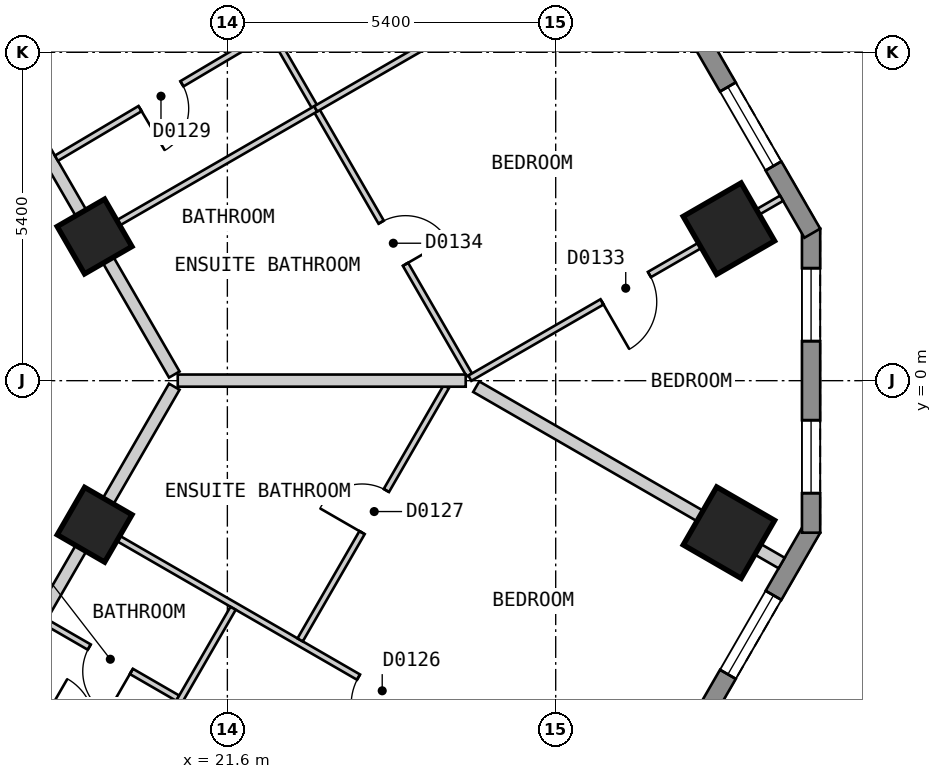
"""IFC4 building model, lengths in metres.
Left out: names, types, materials, properties, quantities, classifications, styles, units other than length and angle.
Written with IfcOpenShell. Run it as: python <this file> out.ifc"""

import sys

from ifc_helpers import new_model, si_unit, direction, frame, frame_2d, origin, origin_2d, place, context, subcontext, project, spatial, polyline, rectangle, outline, extrude, element, fill, save


model = new_model("IFC4")
c1 = context("Model", 3, precision=1e-05, world=origin(), true_north=direction((0.0, 1.0)))
c2 = subcontext(c1, "Body", "Model", "MODEL_VIEW")
j1 = project(units=[si_unit("LENGTHUNIT", "METRE"), si_unit("PLANEANGLEUNIT", "RADIAN")], contexts=[c1])
p1 = place(None, origin())
s1 = spatial("IfcSite", under=j1, at=p1, CompositionType="ELEMENT")
p2 = place(p1, origin())
s2 = spatial("IfcBuilding", under=s1, at=p2, CompositionType="ELEMENT")
p3 = place(p2, frame((0.0, 0.0, 29.4)))
s3 = spatial("IfcBuildingStorey", under=s2, at=p3, CompositionType="ELEMENT", Elevation=29.4)
for number, where, z_axis, x_axis in (
    (1, (29.849, -2.499, 0.0), (0.0, 0.0, 1.0), (0.5, 0.866, 0.0)),
    (2, (29.848, 2.5, 0.0), (0.0, 0.0, 1.0), (-0.5, 0.866, 0.0)),
):
    element("IfcColumn", number, at=place(p3, frame(where, z_axis=z_axis, x_axis=x_axis)), inside=s3, PredefinedType="COLUMN", context=c2, shape_type="SweptSolid", body=[
        extrude(rectangle(XDim=1.1, YDim=1.1, at=origin_2d()), origin(), (0.0, 0.0, 1.0), 3.0),
    ])
for number, where, z_axis, x_axis in (
    (3, (19.417, -2.369, 0.0), (0.0, 0.0, 1.0), (0.5, 0.866, 0.0)),
    (4, (19.416, 2.371, 0.0), (0.0, 0.0, 1.0), (-0.5, 0.866, 0.0)),
):
    element("IfcColumn", number, at=place(p3, frame(where, z_axis=z_axis, x_axis=x_axis)), inside=s3, PredefinedType="COLUMN", context=c2, shape_type="SweptSolid", body=[
        extrude(rectangle(XDim=0.9, YDim=0.9, at=origin_2d()), origin(), (0.0, 0.0, 1.0), 3.0),
    ])
p4 = place(p3, frame((17.71, -25.825, 0.0), z_axis=(0.0, 0.0, 1.0), x_axis=(0.500001938803, 0.866024284413, 0.0)))
e5 = element("IfcWall", 5, at=p4, inside=s3, PredefinedType="SOLIDWALL", context=c2, shape_type="SweptSolid", body=[
    extrude(outline(polyline([(0.0, -0.15), (27.02, -0.15), (26.94, 0.15), (0.08, 0.15), (0.0, -0.15)])), origin(), (0.0, 0.0, 1.0), 2.7),
])
p5 = place(p4, frame((1.277, 0.0, 0.15)))
e6 = element("IfcOpeningElement", 6, at=p5, cuts=e5, PredefinedType="OPENING", context=c2, shape_type="SweptSolid", body=[
    extrude(rectangle(XDim=1.5, YDim=2.1, at=frame_2d((0.75, 1.05))), frame((0.0, 0.16, 0.0), z_axis=(0.0, -1.0, 0.0), x_axis=(1.0, 0.0, 0.0)), (0.0, 0.0, 1.0), 0.32),
])
p6 = place(p4, frame((3.829, 0.0, 0.15)))
e7 = element("IfcOpeningElement", 7, at=p6, cuts=e5, PredefinedType="OPENING", context=c2, shape_type="SweptSolid", body=[
    extrude(rectangle(XDim=1.5, YDim=2.1, at=frame_2d((0.75, 1.05))), frame((0.0, 0.16, 0.0), z_axis=(0.0, -1.0, 0.0), x_axis=(1.0, 0.0, 0.0)), (0.0, 0.0, 1.0), 0.32),
])
p7 = place(p4, frame((6.382, 0.0, 0.15)))
e8 = element("IfcOpeningElement", 8, at=p7, cuts=e5, PredefinedType="OPENING", context=c2, shape_type="SweptSolid", body=[
    extrude(rectangle(XDim=1.5, YDim=2.1, at=frame_2d((0.75, 1.05))), frame((0.0, 0.16, 0.0), z_axis=(0.0, -1.0, 0.0), x_axis=(1.0, 0.0, 0.0)), (0.0, 0.0, 1.0), 0.32),
])
p8 = place(p4, frame((8.933, 0.0, 0.15)))
e9 = element("IfcOpeningElement", 9, at=p8, cuts=e5, PredefinedType="OPENING", context=c2, shape_type="SweptSolid", body=[
    extrude(rectangle(XDim=1.5, YDim=2.1, at=frame_2d((0.75, 1.05))), frame((0.0, 0.16, 0.0), z_axis=(0.0, -1.0, 0.0), x_axis=(1.0, 0.0, 0.0)), (0.0, 0.0, 1.0), 0.32),
])
p9 = place(p4, frame((11.485, 0.0, 0.15)))
e10 = element("IfcOpeningElement", 10, at=p9, cuts=e5, PredefinedType="OPENING", context=c2, shape_type="SweptSolid", body=[
    extrude(rectangle(XDim=1.5, YDim=2.1, at=frame_2d((0.75, 1.05))), frame((0.0, 0.16, 0.0), z_axis=(0.0, -1.0, 0.0), x_axis=(1.0, 0.0, 0.0)), (0.0, 0.0, 1.0), 0.32),
])
p10 = place(p4, frame((14.037, 0.0, 0.15)))
e11 = element("IfcOpeningElement", 11, at=p10, cuts=e5, PredefinedType="OPENING", context=c2, shape_type="SweptSolid", body=[
    extrude(rectangle(XDim=1.5, YDim=2.1, at=frame_2d((0.75, 1.05))), frame((0.0, 0.16, 0.0), z_axis=(0.0, -1.0, 0.0), x_axis=(1.0, 0.0, 0.0)), (0.0, 0.0, 1.0), 0.32),
])
p11 = place(p4, frame((16.589, 0.0, 0.15)))
e12 = element("IfcOpeningElement", 12, at=p11, cuts=e5, PredefinedType="OPENING", context=c2, shape_type="SweptSolid", body=[
    extrude(rectangle(XDim=1.5, YDim=2.1, at=frame_2d((0.75, 1.05))), frame((0.0, 0.16, 0.0), z_axis=(0.0, -1.0, 0.0), x_axis=(1.0, 0.0, 0.0)), (0.0, 0.0, 1.0), 0.32),
])
p12 = place(p4, frame((19.141, 0.0, 0.15)))
e13 = element("IfcOpeningElement", 13, at=p12, cuts=e5, PredefinedType="OPENING", context=c2, shape_type="SweptSolid", body=[
    extrude(rectangle(XDim=1.5, YDim=2.1, at=frame_2d((0.75, 1.05))), frame((0.0, 0.16, 0.0), z_axis=(0.0, -1.0, 0.0), x_axis=(1.0, 0.0, 0.0)), (0.0, 0.0, 1.0), 0.32),
])
p13 = place(p4, frame((21.693, 0.0, 0.15)))
e14 = element("IfcOpeningElement", 14, at=p13, cuts=e5, PredefinedType="OPENING", context=c2, shape_type="SweptSolid", body=[
    extrude(rectangle(XDim=1.5, YDim=2.1, at=frame_2d((0.75, 1.05))), frame((0.0, 0.16, 0.0), z_axis=(0.0, -1.0, 0.0), x_axis=(1.0, 0.0, 0.0)), (0.0, 0.0, 1.0), 0.32),
])
p14 = place(p4, frame((24.244, 0.0, 0.15)))
e15 = element("IfcOpeningElement", 15, at=p14, cuts=e5, PredefinedType="OPENING", context=c2, shape_type="SweptSolid", body=[
    extrude(rectangle(XDim=1.5, YDim=2.1, at=frame_2d((0.75, 1.05))), frame((0.0, 0.16, 0.0), z_axis=(0.0, -1.0, 0.0), x_axis=(1.0, 0.0, 0.0)), (0.0, 0.0, 1.0), 0.32),
])
p15 = place(p3, frame((31.2, -2.5, 0.0), z_axis=(0.0, 0.0, 1.0), x_axis=(0.0, 1.0, 0.0)))
e16 = element("IfcWall", 16, at=p15, inside=s3, PredefinedType="SOLIDWALL", context=c2, shape_type="SweptSolid", body=[
    extrude(outline(polyline([(0.0, -0.15), (5.0, -0.15), (4.92, 0.15), (0.08, 0.15), (0.0, -0.15)])), origin(), (0.0, 0.0, 1.0), 2.7),
])
p16 = place(p15, frame((0.65, 0.0, 0.15)))
e17 = element("IfcOpeningElement", 17, at=p16, cuts=e16, PredefinedType="OPENING", context=c2, shape_type="SweptSolid", body=[
    extrude(rectangle(XDim=1.2, YDim=2.1, at=frame_2d((0.6, 1.05))), frame((0.0, 0.16, 0.0), z_axis=(0.0, -1.0, 0.0), x_axis=(1.0, 0.0, 0.0)), (0.0, 0.0, 1.0), 0.32),
])
p17 = place(p15, frame((3.15, 0.0, 0.15)))
e18 = element("IfcOpeningElement", 18, at=p17, cuts=e16, PredefinedType="OPENING", context=c2, shape_type="SweptSolid", body=[
    extrude(rectangle(XDim=1.2, YDim=2.1, at=frame_2d((0.6, 1.05))), frame((0.0, 0.16, 0.0), z_axis=(0.0, -1.0, 0.0), x_axis=(1.0, 0.0, 0.0)), (0.0, 0.0, 1.0), 0.32),
])
p18 = place(p3, frame((31.22, 2.425, 0.0), z_axis=(0.0, 0.0, 1.0), x_axis=(-0.500001938803, 0.866024284413, 0.0)))
e19 = element("IfcWall", 19, at=p18, inside=s3, PredefinedType="SOLIDWALL", context=c2, shape_type="SweptSolid", body=[
    extrude(outline(polyline([(0.0, -0.15), (27.02, -0.15), (26.94, 0.15), (0.08, 0.15), (0.0, -0.15)])), origin(), (0.0, 0.0, 1.0), 2.7),
])
p19 = place(p18, frame((1.277, 0.0, 0.15)))
e20 = element("IfcOpeningElement", 20, at=p19, cuts=e19, PredefinedType="OPENING", context=c2, shape_type="SweptSolid", body=[
    extrude(rectangle(XDim=1.5, YDim=2.1, at=frame_2d((0.75, 1.05))), frame((0.0, 0.16, 0.0), z_axis=(0.0, -1.0, 0.0), x_axis=(1.0, 0.0, 0.0)), (0.0, 0.0, 1.0), 0.32),
])
p20 = place(p18, frame((3.829, 0.0, 0.15)))
e21 = element("IfcOpeningElement", 21, at=p20, cuts=e19, PredefinedType="OPENING", context=c2, shape_type="SweptSolid", body=[
    extrude(rectangle(XDim=1.5, YDim=2.1, at=frame_2d((0.75, 1.05))), frame((0.0, 0.16, 0.0), z_axis=(0.0, -1.0, 0.0), x_axis=(1.0, 0.0, 0.0)), (0.0, 0.0, 1.0), 0.32),
])
p21 = place(p18, frame((6.382, 0.0, 0.15)))
e22 = element("IfcOpeningElement", 22, at=p21, cuts=e19, PredefinedType="OPENING", context=c2, shape_type="SweptSolid", body=[
    extrude(rectangle(XDim=1.5, YDim=2.1, at=frame_2d((0.75, 1.05))), frame((0.0, 0.16, 0.0), z_axis=(0.0, -1.0, 0.0), x_axis=(1.0, 0.0, 0.0)), (0.0, 0.0, 1.0), 0.32),
])
p22 = place(p18, frame((8.933, 0.0, 0.15)))
e23 = element("IfcOpeningElement", 23, at=p22, cuts=e19, PredefinedType="OPENING", context=c2, shape_type="SweptSolid", body=[
    extrude(rectangle(XDim=1.5, YDim=2.1, at=frame_2d((0.75, 1.05))), frame((0.0, 0.16, 0.0), z_axis=(0.0, -1.0, 0.0), x_axis=(1.0, 0.0, 0.0)), (0.0, 0.0, 1.0), 0.32),
])
p23 = place(p18, frame((11.485, 0.0, 0.15)))
e24 = element("IfcOpeningElement", 24, at=p23, cuts=e19, PredefinedType="OPENING", context=c2, shape_type="SweptSolid", body=[
    extrude(rectangle(XDim=1.5, YDim=2.1, at=frame_2d((0.75, 1.05))), frame((0.0, 0.16, 0.0), z_axis=(0.0, -1.0, 0.0), x_axis=(1.0, 0.0, 0.0)), (0.0, 0.0, 1.0), 0.32),
])
p24 = place(p18, frame((14.037, 0.0, 0.15)))
e25 = element("IfcOpeningElement", 25, at=p24, cuts=e19, PredefinedType="OPENING", context=c2, shape_type="SweptSolid", body=[
    extrude(rectangle(XDim=1.5, YDim=2.1, at=frame_2d((0.75, 1.05))), frame((0.0, 0.16, 0.0), z_axis=(0.0, -1.0, 0.0), x_axis=(1.0, 0.0, 0.0)), (0.0, 0.0, 1.0), 0.32),
])
p25 = place(p18, frame((16.589, 0.0, 0.15)))
e26 = element("IfcOpeningElement", 26, at=p25, cuts=e19, PredefinedType="OPENING", context=c2, shape_type="SweptSolid", body=[
    extrude(rectangle(XDim=1.5, YDim=2.1, at=frame_2d((0.75, 1.05))), frame((0.0, 0.16, 0.0), z_axis=(0.0, -1.0, 0.0), x_axis=(1.0, 0.0, 0.0)), (0.0, 0.0, 1.0), 0.32),
])
p26 = place(p18, frame((19.141, 0.0, 0.15)))
e27 = element("IfcOpeningElement", 27, at=p26, cuts=e19, PredefinedType="OPENING", context=c2, shape_type="SweptSolid", body=[
    extrude(rectangle(XDim=1.5, YDim=2.1, at=frame_2d((0.75, 1.05))), frame((0.0, 0.16, 0.0), z_axis=(0.0, -1.0, 0.0), x_axis=(1.0, 0.0, 0.0)), (0.0, 0.0, 1.0), 0.32),
])
p27 = place(p18, frame((21.693, 0.0, 0.15)))
e28 = element("IfcOpeningElement", 28, at=p27, cuts=e19, PredefinedType="OPENING", context=c2, shape_type="SweptSolid", body=[
    extrude(rectangle(XDim=1.5, YDim=2.1, at=frame_2d((0.75, 1.05))), frame((0.0, 0.16, 0.0), z_axis=(0.0, -1.0, 0.0), x_axis=(1.0, 0.0, 0.0)), (0.0, 0.0, 1.0), 0.32),
])
p28 = place(p18, frame((24.244, 0.0, 0.15)))
e29 = element("IfcOpeningElement", 29, at=p28, cuts=e19, PredefinedType="OPENING", context=c2, shape_type="SweptSolid", body=[
    extrude(rectangle(XDim=1.5, YDim=2.1, at=frame_2d((0.75, 1.05))), frame((0.0, 0.16, 0.0), z_axis=(0.0, -1.0, 0.0), x_axis=(1.0, 0.0, 0.0)), (0.0, 0.0, 1.0), 0.32),
])
p29 = place(p3, frame((10.45, 17.9, 0.0), z_axis=(0.0, 0.0, 1.0), x_axis=(0.500034352617, -0.866005569383, 0.0)))
e30 = element("IfcWall", 30, at=p29, inside=s3, PredefinedType="PARTITIONING", context=c2, shape_type="SweptSolid", body=[
    extrude(rectangle(XDim=20.553, YDim=0.2, at=frame_2d((10.276, 0.0))), origin(), (0.0, 0.0, 1.0), 2.7),
])
p30 = place(p29, frame((14.903, 0.0, 0.0)))
e31 = element("IfcOpeningElement", 31, at=p30, cuts=e30, PredefinedType="OPENING", context=c2, shape_type="SweptSolid", body=[
    extrude(rectangle(XDim=1.0, YDim=2.1, at=frame_2d((0.5, 1.05))), frame((0.0, 0.11, 0.0), z_axis=(0.0, -1.0, 0.0), x_axis=(1.0, 0.0, 0.0)), (0.0, 0.0, 1.0), 0.22),
])
p31 = place(p29, frame((9.775, 0.0, 0.0)))
e32 = element("IfcOpeningElement", 32, at=p31, cuts=e30, PredefinedType="OPENING", context=c2, shape_type="SweptSolid", body=[
    extrude(rectangle(XDim=1.0, YDim=2.1, at=frame_2d((0.5, 1.05))), frame((0.0, 0.11, 0.0), z_axis=(0.0, -1.0, 0.0), x_axis=(1.0, 0.0, 0.0)), (0.0, 0.0, 1.0), 0.22),
])
p32 = place(p3, frame((16.914, -6.703, 0.0), z_axis=(0.0, 0.0, 1.0), x_axis=(0.50003007663, 0.866008038338, 0.0)))
e33 = element("IfcWall", 33, at=p32, inside=s3, PredefinedType="PARTITIONING", context=c2, shape_type="SweptSolid", body=[
    extrude(rectangle(XDim=7.625, YDim=0.2, at=frame_2d((3.813, 0.0))), origin(), (0.0, 0.0, 1.0), 2.7),
])
p33 = place(p32, frame((1.952, 0.0, 0.0)))
e34 = element("IfcOpeningElement", 34, at=p33, cuts=e33, PredefinedType="OPENING", context=c2, shape_type="SweptSolid", body=[
    extrude(rectangle(XDim=1.0, YDim=2.1, at=frame_2d((0.5, 1.05))), frame((0.0, 0.11, 0.0), z_axis=(0.0, -1.0, 0.0), x_axis=(1.0, 0.0, 0.0)), (0.0, 0.0, 1.0), 0.22),
])
p34 = place(p3, frame((20.551, 8.805, 0.0), z_axis=(0.0, 0.0, 1.0), x_axis=(0.499984387913, -0.86603441724, 0.0)))
e35 = element("IfcWall", 35, at=p34, inside=s3, PredefinedType="PARTITIONING", context=c2, shape_type="SweptSolid", body=[
    extrude(rectangle(XDim=10.058, YDim=0.1, at=frame_2d((5.029, 0.0))), origin(), (0.0, 0.0, 1.0), 2.7),
])
p35 = place(p34, frame((1.978, 0.0, 0.0)))
e36 = element("IfcOpeningElement", 36, at=p35, cuts=e35, PredefinedType="OPENING", context=c2, shape_type="SweptSolid", body=[
    extrude(rectangle(XDim=0.9, YDim=2.1, at=frame_2d((0.45, 1.05))), frame((0.0, 0.06, 0.0), z_axis=(0.0, -1.0, 0.0), x_axis=(1.0, 0.0, 0.0)), (0.0, 0.0, 1.0), 0.12),
])
p36 = place(p34, frame((7.157, 0.0, 0.0)))
e37 = element("IfcOpeningElement", 37, at=p36, cuts=e35, PredefinedType="OPENING", context=c2, shape_type="SweptSolid", body=[
    extrude(rectangle(XDim=0.8, YDim=2.1, at=frame_2d((0.4, 1.05))), frame((0.0, 0.06, 0.0), z_axis=(0.0, -1.0, 0.0), x_axis=(1.0, 0.0, 0.0)), (0.0, 0.0, 1.0), 0.12),
])
p37 = place(p3, frame((18.61, -3.966, 0.0), z_axis=(0.0, 0.0, 1.0), x_axis=(0.865958718457, -0.500115484592, 0.0)))
e38 = element("IfcWall", 38, at=p37, inside=s3, PredefinedType="PARTITIONING", context=c2, shape_type="SweptSolid", body=[
    extrude(rectangle(XDim=2.509, YDim=0.1, at=frame_2d((1.255, 0.0))), origin(), (0.0, 0.0, 1.0), 2.7),
])
p38 = place(p37, frame((0.83, 0.0, 0.0)))
e39 = element("IfcOpeningElement", 39, at=p38, cuts=e38, PredefinedType="OPENING", context=c2, shape_type="SweptSolid", body=[
    extrude(rectangle(XDim=0.8, YDim=2.1, at=frame_2d((0.4, 1.05))), frame((0.0, 0.06, 0.0), z_axis=(0.0, -1.0, 0.0), x_axis=(1.0, 0.0, 0.0)), (0.0, 0.0, 1.0), 0.12),
])
p39 = place(p3, frame((19.503, -2.419, 0.0), z_axis=(0.0, 0.0, 1.0), x_axis=(0.866047370643, -0.499961950354, 0.0)))
e40 = element("IfcWall", 40, at=p39, inside=s3, PredefinedType="PARTITIONING", context=c2, shape_type="SweptSolid", body=[
    extrude(rectangle(XDim=10.001, YDim=0.1, at=frame_2d((5.0, 0.0))), origin(), (0.0, 0.0, 1.0), 2.7),
])
p40 = place(p39, frame((4.912, 0.0, 0.0)))
e41 = element("IfcOpeningElement", 41, at=p40, cuts=e40, PredefinedType="OPENING", context=c2, shape_type="SweptSolid", body=[
    extrude(rectangle(XDim=0.9, YDim=2.1, at=frame_2d((0.45, 1.05))), frame((0.0, 0.06, 0.0), z_axis=(0.0, -1.0, 0.0), x_axis=(1.0, 0.0, 0.0)), (0.0, 0.0, 1.0), 0.12),
])
p41 = place(p3, frame((20.062, -6.571, 0.0), z_axis=(0.0, 0.0, 1.0), x_axis=(0.49983032932, 0.866123341039, 0.0)))
e42 = element("IfcWall", 42, at=p41, inside=s3, PredefinedType="PARTITIONING", context=c2, shape_type="SweptSolid", body=[
    extrude(rectangle(XDim=3.265, YDim=0.1, at=frame_2d((1.633, 0.0))), origin(), (0.0, 0.0, 1.0), 2.7),
])
p42 = place(p3, frame((22.797, -4.263, 0.0), z_axis=(0.0, 0.0, 1.0), x_axis=(0.499820637322, 0.866128934112, 0.0)))
e43 = element("IfcWall", 43, at=p42, inside=s3, PredefinedType="PARTITIONING", context=c2, shape_type="SweptSolid", body=[
    extrude(rectangle(XDim=4.807, YDim=0.1, at=frame_2d((2.404, 0.0))), origin(), (0.0, 0.0, 1.0), 2.7),
])
p43 = place(p42, frame((2.037, 0.0, 0.0)))
e44 = element("IfcOpeningElement", 44, at=p43, cuts=e43, PredefinedType="OPENING", context=c2, shape_type="SweptSolid", body=[
    extrude(rectangle(XDim=0.8, YDim=2.1, at=frame_2d((0.4, 1.05))), frame((0.0, 0.06, 0.0), z_axis=(0.0, -1.0, 0.0), x_axis=(1.0, 0.0, 0.0)), (0.0, 0.0, 1.0), 0.12),
])
p44 = place(p3, frame((19.503, 2.421, 0.0), z_axis=(0.0, 0.0, 1.0), x_axis=(0.866083434238, 0.499899474834, 0.0)))
e45 = element("IfcWall", 45, at=p44, inside=s3, PredefinedType="PARTITIONING", context=c2, shape_type="SweptSolid", body=[
    extrude(rectangle(XDim=4.099, YDim=0.1, at=frame_2d((2.049, 0.0))), origin(), (0.0, 0.0, 1.0), 2.7),
])
p45 = place(p3, frame((25.588, 0.041, 0.0), z_axis=(0.0, 0.0, 1.0), x_axis=(0.866113484451, 0.499847408768, 0.0)))
e46 = element("IfcWall", 46, at=p45, inside=s3, PredefinedType="PARTITIONING", context=c2, shape_type="SweptSolid", body=[
    extrude(rectangle(XDim=5.92, YDim=0.1, at=frame_2d((2.96, 0.0))), origin(), (0.0, 0.0, 1.0), 2.7),
])
p46 = place(p45, frame((2.51, 0.0, 0.0)))
e47 = element("IfcOpeningElement", 47, at=p46, cuts=e46, PredefinedType="OPENING", context=c2, shape_type="SweptSolid", body=[
    extrude(rectangle(XDim=0.9, YDim=2.1, at=frame_2d((0.45, 1.05))), frame((0.0, 0.06, 0.0), z_axis=(0.0, -1.0, 0.0), x_axis=(1.0, 0.0, 0.0)), (0.0, 0.0, 1.0), 0.12),
])
p47 = place(p3, frame((18.788, 3.658, 0.0), z_axis=(0.0, 0.0, 1.0), x_axis=(0.860114269096, 0.510101405701, 0.0)))
e48 = element("IfcWall", 48, at=p47, inside=s3, PredefinedType="PARTITIONING", context=c2, shape_type="SweptSolid", body=[
    extrude(rectangle(XDim=4.051, YDim=0.1, at=frame_2d((2.025, 0.0))), origin(), (0.0, 0.0, 1.0), 2.7),
])
p48 = place(p47, frame((1.6, 0.0, 0.0)))
e49 = element("IfcOpeningElement", 49, at=p48, cuts=e48, PredefinedType="OPENING", context=c2, shape_type="SweptSolid", body=[
    extrude(rectangle(XDim=0.8, YDim=2.1, at=frame_2d((0.4, 1.05))), frame((0.0, 0.06, 0.0), z_axis=(0.0, -1.0, 0.0), x_axis=(1.0, 0.0, 0.0)), (0.0, 0.0, 1.0), 0.12),
])
p49 = place(p3, frame((25.693, -0.099, 0.0), z_axis=(0.0, 0.0, 1.0), x_axis=(0.866032775405, -0.499987231761, 0.0)))
e50 = element("IfcWall", 50, at=p49, inside=s3, PredefinedType="PARTITIONING", context=c2, shape_type="SweptSolid", body=[
    extrude(rectangle(XDim=5.8, YDim=0.2, at=frame_2d((2.9, 0.0))), origin(), (0.0, 0.0, 1.0), 2.7),
])
p50 = place(p3, frame((20.784, 0.001, 0.0), z_axis=(0.0, 0.0, 1.0), x_axis=(1.0, 0.0, 0.0)))
e51 = element("IfcWall", 51, at=p50, inside=s3, PredefinedType="PARTITIONING", context=c2, shape_type="SweptSolid", body=[
    extrude(rectangle(XDim=4.736, YDim=0.2, at=frame_2d((2.368, 0.0))), origin(), (0.0, 0.0, 1.0), 2.7),
])
p51 = place(p3, frame((23.053, 4.47, 0.0), z_axis=(0.0, 0.0, 1.0), x_axis=(0.866052608538, 0.499952877023, 0.0)))
e52 = element("IfcWall", 52, at=p51, inside=s3, PredefinedType="PARTITIONING", context=c2, shape_type="SweptSolid", body=[
    extrude(rectangle(XDim=5.9, YDim=0.1, at=frame_2d((2.95, 0.0))), origin(), (0.0, 0.0, 1.0), 2.7),
])
p52 = place(p51, frame((2.501, 0.0, 0.0)))
e53 = element("IfcOpeningElement", 53, at=p52, cuts=e52, PredefinedType="OPENING", context=c2, shape_type="SweptSolid", body=[
    extrude(rectangle(XDim=0.9, YDim=2.1, at=frame_2d((0.45, 1.05))), frame((0.0, 0.06, 0.0), z_axis=(0.0, -1.0, 0.0), x_axis=(1.0, 0.0, 0.0)), (0.0, 0.0, 1.0), 0.12),
])
p53 = place(p14, origin())
e54 = element("IfcWindow", 54, at=p53, inside=s3, PartitioningType="SINGLE_PANEL", PredefinedType="WINDOW", context=c2, shape_type="SweptSolid", body=[
    extrude(rectangle(XDim=1.5, YDim=2.1, at=frame_2d((0.75, 1.05))), frame((0.0, 0.03, 0.0), z_axis=(0.0, -1.0, 0.0), x_axis=(1.0, 0.0, 0.0)), (0.0, 0.0, 1.0), 0.06),
])
fill(e15, e54)
p54 = place(p16, origin())
e55 = element("IfcWindow", 55, at=p54, inside=s3, PartitioningType="SINGLE_PANEL", PredefinedType="WINDOW", context=c2, shape_type="SweptSolid", body=[
    extrude(rectangle(XDim=1.2, YDim=2.1, at=frame_2d((0.6, 1.05))), frame((0.0, 0.03, 0.0), z_axis=(0.0, -1.0, 0.0), x_axis=(1.0, 0.0, 0.0)), (0.0, 0.0, 1.0), 0.06),
])
fill(e17, e55)
p55 = place(p17, origin())
e56 = element("IfcWindow", 56, at=p55, inside=s3, PartitioningType="SINGLE_PANEL", PredefinedType="WINDOW", context=c2, shape_type="SweptSolid", body=[
    extrude(rectangle(XDim=1.2, YDim=2.1, at=frame_2d((0.6, 1.05))), frame((0.0, 0.03, 0.0), z_axis=(0.0, -1.0, 0.0), x_axis=(1.0, 0.0, 0.0)), (0.0, 0.0, 1.0), 0.06),
])
fill(e18, e56)
p56 = place(p19, origin())
e57 = element("IfcWindow", 57, at=p56, inside=s3, PartitioningType="SINGLE_PANEL", PredefinedType="WINDOW", context=c2, shape_type="SweptSolid", body=[
    extrude(rectangle(XDim=1.5, YDim=2.1, at=frame_2d((0.75, 1.05))), frame((0.0, 0.03, 0.0), z_axis=(0.0, -1.0, 0.0), x_axis=(1.0, 0.0, 0.0)), (0.0, 0.0, 1.0), 0.06),
])
fill(e20, e57)
p57 = place(p38, origin())
e58 = element("IfcDoor", 58, at=p57, inside=s3, OperationType="SINGLE_SWING_RIGHT", PredefinedType="DOOR", context=c2, shape_type="SweptSolid", body=[
    extrude(rectangle(XDim=0.8, YDim=2.1, at=frame_2d((0.4, 1.05))), frame((0.0, 0.025, 0.0), z_axis=(0.0, -1.0, 0.0), x_axis=(1.0, 0.0, 0.0)), (0.0, 0.0, 1.0), 0.05),
])
fill(e39, e58)
p58 = place(p40, origin())
e59 = element("IfcDoor", 59, at=p58, inside=s3, OperationType="SINGLE_SWING_RIGHT", PredefinedType="DOOR", context=c2, shape_type="SweptSolid", body=[
    extrude(rectangle(XDim=0.9, YDim=2.1, at=frame_2d((0.45, 1.05))), frame((0.0, 0.025, 0.0), z_axis=(0.0, -1.0, 0.0), x_axis=(1.0, 0.0, 0.0)), (0.0, 0.0, 1.0), 0.05),
])
fill(e41, e59)
p59 = place(p43, origin())
e60 = element("IfcDoor", 60, at=p59, inside=s3, OperationType="SINGLE_SWING_LEFT", PredefinedType="DOOR", context=c2, shape_type="SweptSolid", body=[
    extrude(rectangle(XDim=0.8, YDim=2.1, at=frame_2d((0.4, 1.05))), frame((0.0, 0.025, 0.0), z_axis=(0.0, -1.0, 0.0), x_axis=(1.0, 0.0, 0.0)), (0.0, 0.0, 1.0), 0.05),
])
fill(e44, e60)
p60 = place(p48, origin())
e61 = element("IfcDoor", 61, at=p60, inside=s3, OperationType="SINGLE_SWING_LEFT", PredefinedType="DOOR", context=c2, shape_type="SweptSolid", body=[
    extrude(rectangle(XDim=0.8, YDim=2.1, at=frame_2d((0.4, 1.05))), frame((0.0, 0.025, 0.0), z_axis=(0.0, -1.0, 0.0), x_axis=(1.0, 0.0, 0.0)), (0.0, 0.0, 1.0), 0.05),
])
fill(e49, e61)
p61 = place(p46, origin())
e62 = element("IfcDoor", 62, at=p61, inside=s3, OperationType="SINGLE_SWING_LEFT", PredefinedType="DOOR", context=c2, shape_type="SweptSolid", body=[
    extrude(rectangle(XDim=0.9, YDim=2.1, at=frame_2d((0.45, 1.05))), frame((0.0, 0.025, 0.0), z_axis=(0.0, -1.0, 0.0), x_axis=(1.0, 0.0, 0.0)), (0.0, 0.0, 1.0), 0.05),
])
fill(e47, e62)
p62 = place(p36, origin())
e63 = element("IfcDoor", 63, at=p62, inside=s3, OperationType="SINGLE_SWING_RIGHT", PredefinedType="DOOR", context=c2, shape_type="SweptSolid", body=[
    extrude(rectangle(XDim=0.8, YDim=2.1, at=frame_2d((0.4, 1.05))), frame((0.0, 0.025, 0.0), z_axis=(0.0, -1.0, 0.0), x_axis=(1.0, 0.0, 0.0)), (0.0, 0.0, 1.0), 0.05),
])
fill(e37, e63)
save(model, sys.argv[1])
